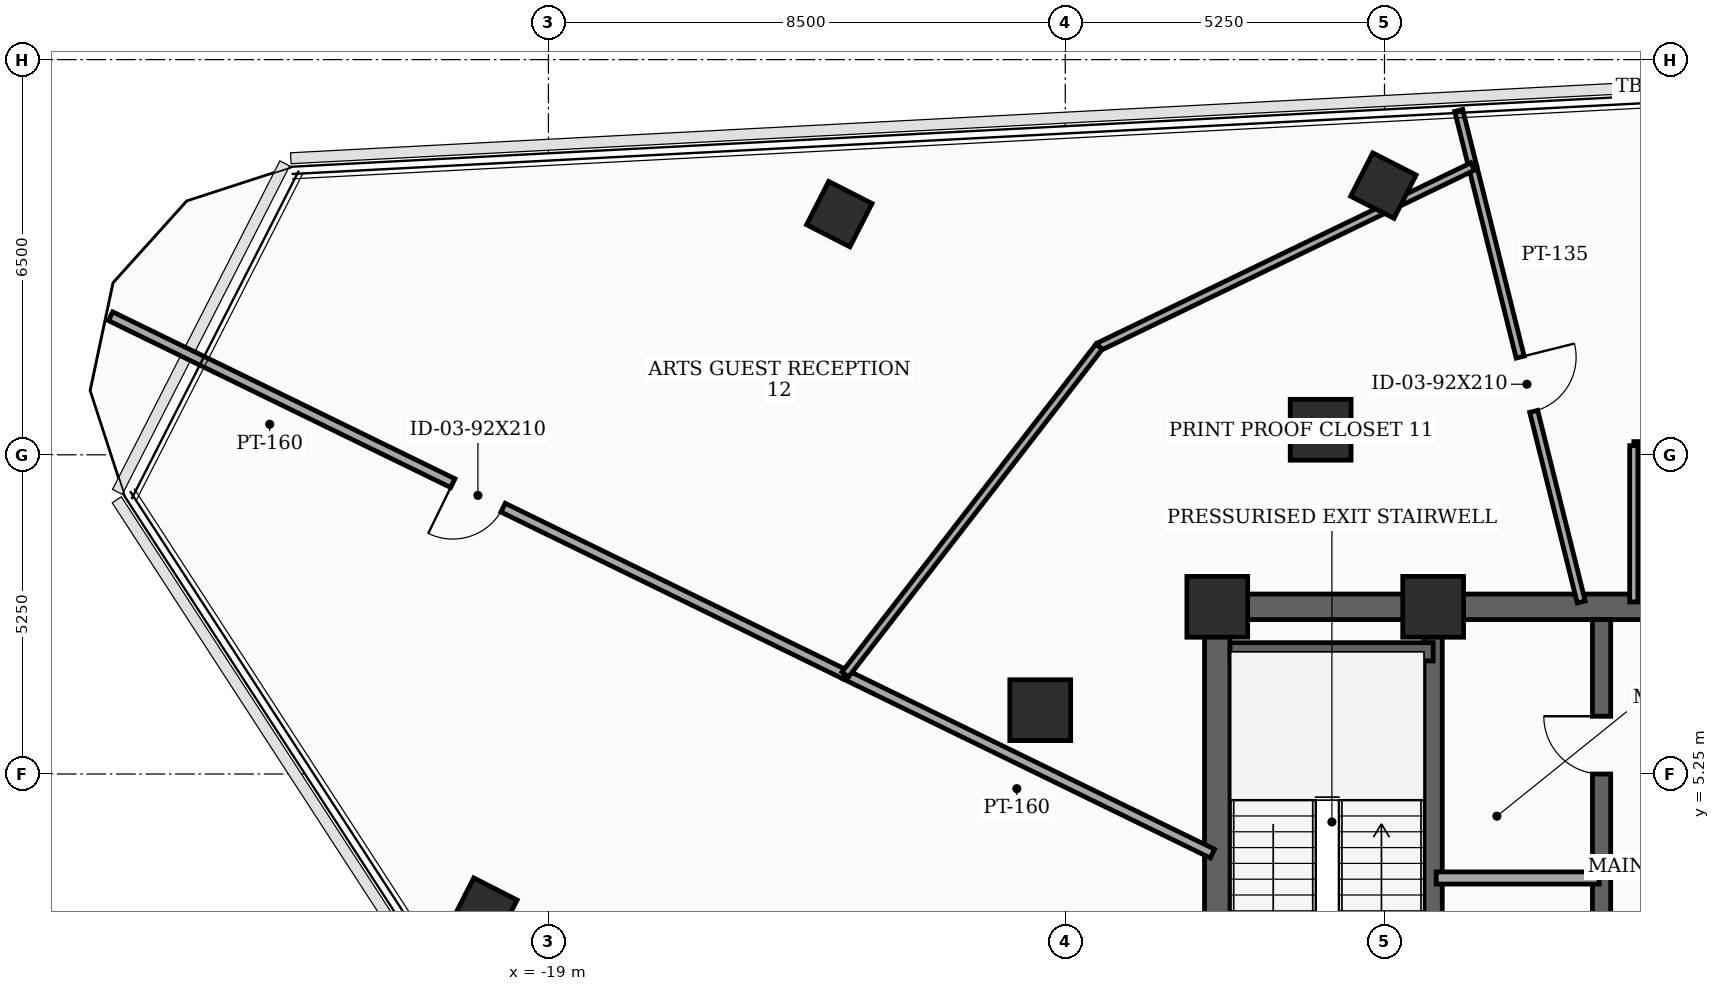
"""IFC4 building model, lengths in metres.
Left out: names, types, materials, properties, quantities, classifications, styles, units other than length and angle.
Written with IfcOpenShell. Run it as: python <this file> out.ifc"""

import sys

from ifc_helpers import new_model, si_unit, direction, frame, frame_2d, origin, origin_2d, place, context, subcontext, project, spatial, rectangle, extrude, element, fill, save


model = new_model("IFC4")
c1 = context("Model", 3, precision=1e-05, world=origin(), true_north=direction((0.0, 1.0)))
c2 = subcontext(c1, "Body", "Model", "MODEL_VIEW")
j1 = project(units=[si_unit("LENGTHUNIT", "METRE"), si_unit("PLANEANGLEUNIT", "RADIAN")], contexts=[c1])
p1 = place(None, origin())
s1 = spatial("IfcSite", under=j1, at=p1, CompositionType="ELEMENT")
p2 = place(p1, origin())
s2 = spatial("IfcBuilding", under=s1, at=p2, CompositionType="ELEMENT")
p3 = place(p2, frame((0.0, 0.0, 255.9)))
s3 = spatial("IfcBuildingStorey", under=s2, at=p3, CompositionType="ELEMENT", Elevation=255.9)
for number, where, z_axis, x_axis in (
    (1, (-4.45, 8.0, 0.0), (0.0, 0.0, 1.0), (1.0, 0.0, 0.0)),
    (2, (-8.0, 8.0, 0.0), (0.0, 0.0, 1.0), (1.0, 0.0, 0.0)),
    (3, (-6.3, 10.912, 0.0), (0.0, 0.0, 1.0), (1.0, 0.0, 0.0)),
    (4, (-10.912, 6.3, 0.0), (0.0, 0.0, 1.0), (1.0, 0.0, 0.0)),
):
    element("IfcColumn", number, at=place(p3, frame(where, z_axis=z_axis, x_axis=x_axis)), inside=s3, PredefinedType="COLUMN", context=c2, shape_type="SweptSolid", body=[
        extrude(rectangle(XDim=1.0, YDim=1.0, at=origin_2d()), origin(), (0.0, 0.0, 1.0), 3.7),
    ])
for number, where, z_axis, x_axis in (
    (5, (-5.269, 14.927, 0.0), (0.0, 0.0, 1.0), (0.454, 0.891, 0.0)),
    (6, (-14.216, 14.458, 0.0), (0.0, 0.0, 1.0), (0.454, 0.891, 0.0)),
    (7, (-20.053, 3.003, 0.0), (0.0, 0.0, 1.0), (0.454, 0.891, 0.0)),
):
    element("IfcColumn", number, at=place(p3, frame(where, z_axis=z_axis, x_axis=x_axis)), inside=s3, PredefinedType="COLUMN", context=c2, shape_type="SweptSolid", body=[
        extrude(rectangle(XDim=0.8, YDim=0.8, at=origin_2d()), origin(), (0.0, 0.0, 1.0), 3.7),
    ])
p4 = place(p3, frame((-8.0, -8.0, 0.0), z_axis=(0.0, 0.0, 1.0), x_axis=(0.0, 1.0, 0.0)))
e8 = element("IfcWall", 8, at=p4, inside=s3, PredefinedType="SHEAR", context=c2, shape_type="SweptSolid", body=[
    extrude(rectangle(XDim=16.0, YDim=0.42, at=frame_2d((8.0, 0.0))), origin(), (0.0, 0.0, 1.0), 3.5),
])
p5 = place(p4, frame((0.681, 0.0, 0.0)))
e9 = element("IfcOpeningElement", 9, at=p5, cuts=e8, PredefinedType="OPENING", context=c2, shape_type="SweptSolid", body=[
    extrude(rectangle(XDim=0.85, YDim=2.02, at=frame_2d((0.425, 1.01))), frame((0.0, 0.22, 0.0), z_axis=(0.0, -1.0, 0.0), x_axis=(1.0, 0.0, 0.0)), (0.0, 0.0, 1.0), 0.44),
])
p6 = place(p4, frame((5.35, 0.0, 0.0)))
e10 = element("IfcOpeningElement", 10, at=p6, cuts=e8, PredefinedType="OPENING", context=c2, shape_type="SweptSolid", body=[
    extrude(rectangle(XDim=1.05, YDim=2.15, at=frame_2d((0.525, 1.075))), frame((0.0, 0.22, 0.0), z_axis=(0.0, -1.0, 0.0), x_axis=(1.0, 0.0, 0.0)), (0.0, 0.0, 1.0), 0.44),
])
p7 = place(p3, frame((-8.0, 8.0, 0.0), z_axis=(0.0, 0.0, 1.0), x_axis=(1.0, 0.0, 0.0)))
e11 = element("IfcWall", 11, at=p7, inside=s3, PredefinedType="SHEAR", context=c2, shape_type="SweptSolid", body=[
    extrude(rectangle(XDim=16.0, YDim=0.42, at=frame_2d((8.0, 0.0))), origin(), (0.0, 0.0, 1.0), 3.5),
])
p8 = place(p7, frame((7.1, 0.0, 0.0)))
e12 = element("IfcOpeningElement", 12, at=p8, cuts=e11, PredefinedType="OPENING", context=c2, shape_type="SweptSolid", body=[
    extrude(rectangle(XDim=1.8, YDim=2.15, at=frame_2d((0.9, 1.075))), frame((0.0, 0.22, 0.0), z_axis=(0.0, -1.0, 0.0), x_axis=(1.0, 0.0, 0.0)), (0.0, 0.0, 1.0), 0.44),
])
p9 = place(p3, frame((-4.45, -7.79, 0.0), z_axis=(0.0, 0.0, 1.0), x_axis=(0.0, 1.0, 0.0)))
e13 = element("IfcWall", 13, at=p9, inside=s3, PredefinedType="SHEAR", context=c2, shape_type="SweptSolid", body=[
    extrude(rectangle(XDim=15.58, YDim=0.3, at=frame_2d((7.79, 0.0))), origin(), (0.0, 0.0, 1.0), 3.5),
])
p10 = place(p3, frame((-7.79, 7.26, 0.0), z_axis=(0.0, 0.0, 1.0), x_axis=(1.0, 0.0, 0.0)))
e14 = element("IfcWall", 14, at=p10, inside=s3, PredefinedType="SHEAR", context=c2, shape_type="SweptSolid", body=[
    extrude(rectangle(XDim=3.34, YDim=0.3, at=frame_2d((1.67, 0.0))), origin(), (0.0, 0.0, 1.0), 3.5),
])
p11 = place(p3, frame((-1.68, -4.85, 0.0), z_axis=(0.0, 0.0, 1.0), x_axis=(0.0, 1.0, 0.0)))
e15 = element("IfcWall", 15, at=p11, inside=s3, PredefinedType="SHEAR", context=c2, shape_type="SweptSolid", body=[
    extrude(rectangle(XDim=12.64, YDim=0.3, at=frame_2d((6.32, 0.0))), origin(), (0.0, 0.0, 1.0), 3.5),
])
p12 = place(p11, frame((1.65, 0.0, 0.0)))
e16 = element("IfcOpeningElement", 16, at=p12, cuts=e15, PredefinedType="OPENING", context=c2, shape_type="SweptSolid", body=[
    extrude(rectangle(XDim=0.95, YDim=2.1, at=frame_2d((0.475, 1.05))), frame((0.0, 0.16, 0.0), z_axis=(0.0, -1.0, 0.0), x_axis=(1.0, 0.0, 0.0)), (0.0, 0.0, 1.0), 0.32),
])
p13 = place(p11, frame((5.9, 0.0, 0.0)))
e17 = element("IfcOpeningElement", 17, at=p13, cuts=e15, PredefinedType="OPENING", context=c2, shape_type="SweptSolid", body=[
    extrude(rectangle(XDim=0.95, YDim=2.1, at=frame_2d((0.475, 1.05))), frame((0.0, 0.16, 0.0), z_axis=(0.0, -1.0, 0.0), x_axis=(1.0, 0.0, 0.0)), (0.0, 0.0, 1.0), 0.32),
])
p14 = place(p11, frame((10.1, 0.0, 0.0)))
e18 = element("IfcOpeningElement", 18, at=p14, cuts=e15, PredefinedType="OPENING", context=c2, shape_type="SweptSolid", body=[
    extrude(rectangle(XDim=0.95, YDim=2.1, at=frame_2d((0.475, 1.05))), frame((0.0, 0.16, 0.0), z_axis=(0.0, -1.0, 0.0), x_axis=(1.0, 0.0, 0.0)), (0.0, 0.0, 1.0), 0.32),
])
p15 = place(p3, frame((-4.4, 3.54, 0.0), z_axis=(0.0, 0.0, 1.0), x_axis=(1.0, 0.0, 0.0)))
e19 = element("IfcWall", 19, at=p15, inside=s3, PredefinedType="SOLIDWALL", context=c2, shape_type="SweptSolid", body=[
    extrude(rectangle(XDim=2.68, YDim=0.2, at=frame_2d((1.34, 0.0))), origin(), (0.0, 0.0, 1.0), 3.5),
])
p16 = place(p3, frame((4.742, 10.65, 0.0), z_axis=(0.0, 0.0, 1.0), x_axis=(-1.0, 0.0, 0.0)))
e20 = element("IfcWall", 20, at=p16, inside=s3, PredefinedType="PARTITIONING", context=c2, shape_type="SweptSolid", body=[
    extrude(rectangle(XDim=5.892, YDim=0.135, at=frame_2d((2.946, 0.0))), origin(), (0.0, 0.0, 1.0), 2.885),
])
p17 = place(p16, frame((2.471, 0.0, 0.0)))
e21 = element("IfcOpeningElement", 21, at=p17, cuts=e20, PredefinedType="OPENING", context=c2, shape_type="SweptSolid", body=[
    extrude(rectangle(XDim=0.95, YDim=2.1, at=frame_2d((0.475, 1.05))), frame((0.0, 0.077, 0.0), z_axis=(0.0, -1.0, 0.0), x_axis=(1.0, 0.0, 0.0)), (0.0, 0.0, 1.0), 0.155),
])
p18 = place(p3, frame((-1.15, 10.65, 0.0), z_axis=(0.0, 0.0, 1.0), x_axis=(0.0, -1.0, 0.0)))
e22 = element("IfcWall", 22, at=p18, inside=s3, PredefinedType="PARTITIONING", context=c2, shape_type="SweptSolid", body=[
    extrude(rectangle(XDim=2.57, YDim=0.135, at=frame_2d((1.285, 0.0))), origin(), (0.0, 0.0, 1.0), 2.885),
])
p19 = place(p3, frame((-8.08, 3.941, 0.0), z_axis=(0.0, 0.0, 1.0), x_axis=(-0.898794985177, 0.438369221798, 0.0)))
e23 = element("IfcWall", 23, at=p19, inside=s3, PredefinedType="PARTITIONING", context=c2, shape_type="SweptSolid", body=[
    extrude(rectangle(XDim=6.719, YDim=0.16, at=frame_2d((3.359, 0.0))), origin(), (0.0, 0.0, 1.0), 2.885),
])
p20 = place(p3, frame((-14.119, 6.886, 0.0), z_axis=(0.0, 0.0, 1.0), x_axis=(-0.898768620199, 0.438423274184, 0.0)))
e24 = element("IfcWall", 24, at=p20, inside=s3, PredefinedType="PARTITIONING", context=c2, shape_type="SweptSolid", body=[
    extrude(rectangle(XDim=13.442, YDim=0.16, at=frame_2d((6.721, 0.0))), origin(), (0.0, 0.0, 1.0), 3.035),
])
p21 = place(p20, frame((6.261, 0.0, 0.0)))
e25 = element("IfcOpeningElement", 25, at=p21, cuts=e24, PredefinedType="OPENING", context=c2, shape_type="SweptSolid", body=[
    extrude(rectangle(XDim=0.92, YDim=2.1, at=frame_2d((0.46, 1.05))), frame((0.0, 0.09, 0.0), z_axis=(0.0, -1.0, 0.0), x_axis=(1.0, 0.0, 0.0)), (0.0, 0.0, 1.0), 0.18),
])
p22 = place(p3, frame((-3.8, 15.242, 0.0), z_axis=(0.0, 0.0, 1.0), x_axis=(0.241889603588, -0.970303777008, 0.0)))
e26 = element("IfcWall", 26, at=p22, inside=s3, PredefinedType="PARTITIONING", context=c2, shape_type="SweptSolid", body=[
    extrude(rectangle(XDim=7.381, YDim=0.135, at=frame_2d((3.69, 0.0))), origin(), (0.0, 0.0, 1.0), 2.885),
])
p23 = place(p22, frame((3.231, 0.0, 0.0)))
e27 = element("IfcOpeningElement", 27, at=p23, cuts=e26, PredefinedType="OPENING", context=c2, shape_type="SweptSolid", body=[
    extrude(rectangle(XDim=0.92, YDim=2.1, at=frame_2d((0.46, 1.05))), frame((0.0, 0.077, 0.0), z_axis=(0.0, -1.0, 0.0), x_axis=(1.0, 0.0, 0.0)), (0.0, 0.0, 1.0), 0.155),
])
p24 = place(p3, frame((-4.03, 16.164, 0.0), z_axis=(0.0, 0.0, 1.0), x_axis=(0.241809991188, -0.970323620326, 0.0)))
e28 = element("IfcWall", 28, at=p24, inside=s3, PredefinedType="PARTITIONING", context=c2, shape_type="SweptSolid", body=[
    extrude(rectangle(XDim=0.95, YDim=0.135, at=frame_2d((0.475, 0.0))), origin(), (0.0, 0.0, 1.0), 3.5),
])
p25 = place(p3, frame((-3.8, 15.242, 0.0), z_axis=(0.0, 0.0, 1.0), x_axis=(-0.900708156853, -0.434424695635, 0.0)))
e29 = element("IfcWall", 29, at=p25, inside=s3, PredefinedType="PARTITIONING", context=c2, shape_type="SweptSolid", body=[
    extrude(rectangle(XDim=6.82, YDim=0.135, at=frame_2d((3.41, 0.0))), origin(), (0.0, 0.0, 1.0), 3.035),
])
p26 = place(p3, frame((-9.943, 12.279, 0.0), z_axis=(0.0, 0.0, 1.0), x_axis=(-0.612219395693, -0.790687935621, 0.0)))
e30 = element("IfcWall", 30, at=p26, inside=s3, PredefinedType="PARTITIONING", context=c2, shape_type="SweptSolid", body=[
    extrude(rectangle(XDim=6.821, YDim=0.135, at=frame_2d((3.41, 0.0))), origin(), (0.0, 0.0, 1.0), 3.185),
])
p27 = place(p14, origin())
e31 = element("IfcDoor", 31, at=p27, inside=s3, OperationType="SINGLE_SWING_RIGHT", PredefinedType="DOOR", context=c2, shape_type="SweptSolid", body=[
    extrude(rectangle(XDim=0.95, YDim=2.1, at=frame_2d((0.475, 1.05))), frame((0.0, 0.025, 0.0), z_axis=(0.0, -1.0, 0.0), x_axis=(1.0, 0.0, 0.0)), (0.0, 0.0, 1.0), 0.05),
])
fill(e18, e31)
p28 = place(p21, origin())
e32 = element("IfcDoor", 32, at=p28, inside=s3, OperationType="SINGLE_SWING_RIGHT", PredefinedType="DOOR", context=c2, shape_type="SweptSolid", body=[
    extrude(rectangle(XDim=0.92, YDim=2.1, at=frame_2d((0.46, 1.05))), frame((0.0, 0.025, 0.0), z_axis=(0.0, -1.0, 0.0), x_axis=(1.0, 0.0, 0.0)), (0.0, 0.0, 1.0), 0.05),
])
fill(e25, e32)
p29 = place(p23, origin())
e33 = element("IfcDoor", 33, at=p29, inside=s3, OperationType="SINGLE_SWING_LEFT", PredefinedType="DOOR", context=c2, shape_type="SweptSolid", body=[
    extrude(rectangle(XDim=0.92, YDim=2.1, at=frame_2d((0.46, 1.05))), frame((0.0, 0.025, 0.0), z_axis=(0.0, -1.0, 0.0), x_axis=(1.0, 0.0, 0.0)), (0.0, 0.0, 1.0), 0.05),
])
fill(e27, e33)
save(model, sys.argv[1])
